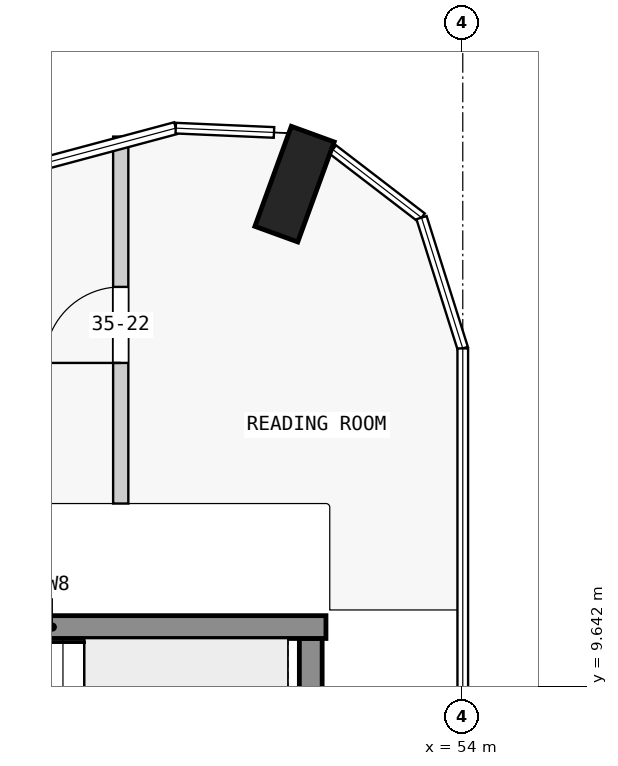
"""IFC4 building model, lengths in metres.
Left out: names, types, materials, properties, quantities, classifications, styles, units other than length and angle.
Written with IfcOpenShell. Run it as: python <this file> out.ifc"""

import sys

from ifc_helpers import new_model, si_unit, direction, frame, frame_2d, origin, origin_2d, place, context, subcontext, project, spatial, rectangle, extrude, element, fill, save


model = new_model("IFC4")
c1 = context("Model", 3, precision=1e-05, world=origin(), true_north=direction((0.0, 1.0)))
c2 = subcontext(c1, "Body", "Model", "MODEL_VIEW")
j1 = project(units=[si_unit("LENGTHUNIT", "METRE"), si_unit("PLANEANGLEUNIT", "RADIAN")], contexts=[c1])
p1 = place(None, origin())
s1 = spatial("IfcSite", under=j1, at=p1, CompositionType="ELEMENT")
p2 = place(p1, origin())
s2 = spatial("IfcBuilding", under=s1, at=p2, CompositionType="ELEMENT")
p3 = place(p2, frame((0.0, 0.0, 139.4)))
s3 = spatial("IfcBuildingStorey", under=s2, at=p3, CompositionType="ELEMENT", Elevation=139.4)
p4 = place(p3, frame((51.787, 16.252, 0.0), z_axis=(0.0, 0.0, 1.0), x_axis=(-0.939664280925, 0.342097996418, 0.0)))
e1 = element("IfcColumn", 1, at=p4, inside=s3, PredefinedType="COLUMN", context=c2, shape_type="SweptSolid", body=[
    extrude(rectangle(XDim=0.6, YDim=1.4, at=origin_2d()), origin(), (0.0, 0.0, 1.0), 3.5),
])
p5 = place(p3, frame((52.0, 7.725, 0.0), z_axis=(0.0, 0.0, 1.0), x_axis=(0.0, 1.0, 0.0)))
e2 = element("IfcWall", 2, at=p5, inside=s3, PredefinedType="SHEAR", context=c2, shape_type="SweptSolid", body=[
    extrude(rectangle(XDim=2.55, YDim=0.3, at=frame_2d((1.275, 0.0))), origin(), (0.0, 0.0, 1.0), 3.5),
])
p6 = place(p3, frame((45.0, 10.425, 0.0), z_axis=(0.0, 0.0, 1.0), x_axis=(1.0, 0.0, 0.0)))
e3 = element("IfcWall", 3, at=p6, inside=s3, PredefinedType="SHEAR", context=c2, shape_type="SweptSolid", body=[
    extrude(rectangle(XDim=7.2, YDim=0.3, at=frame_2d((3.6, 0.0))), origin(), (0.0, 0.0, 1.0), 3.5),
])
p7 = place(p3, frame((49.5, 12.05, 0.0), z_axis=(0.0, 0.0, 1.0), x_axis=(0.0, 1.0, 0.0)))
e4 = element("IfcWall", 4, at=p7, inside=s3, PredefinedType="PARTITIONING", context=c2, shape_type="SweptSolid", body=[
    extrude(rectangle(XDim=4.828, YDim=0.2, at=frame_2d((2.414, 0.0))), origin(), (0.0, 0.0, 1.0), 3.25),
])
p8 = place(p7, frame((1.85, 0.0, 0.0)))
e5 = element("IfcOpeningElement", 5, at=p8, cuts=e4, PredefinedType="OPENING", context=c2, shape_type="SweptSolid", body=[
    extrude(rectangle(XDim=1.0, YDim=2.1, at=frame_2d((0.5, 1.05))), frame((0.0, 0.11, 0.0), z_axis=(0.0, -1.0, 0.0), x_axis=(1.0, 0.0, 0.0)), (0.0, 0.0, 1.0), 0.22),
])
p9 = place(p8, origin())
e6 = element("IfcDoor", 6, at=p9, inside=s3, OperationType="SINGLE_SWING_LEFT", PredefinedType="DOOR", context=c2, shape_type="SweptSolid", body=[
    extrude(rectangle(XDim=1.0, YDim=2.1, at=frame_2d((0.5, 1.05))), frame((0.0, 0.025, 0.0), z_axis=(0.0, -1.0, 0.0), x_axis=(1.0, 0.0, 0.0)), (0.0, 0.0, 1.0), 0.05),
])
fill(e5, e6)
save(model, sys.argv[1])
